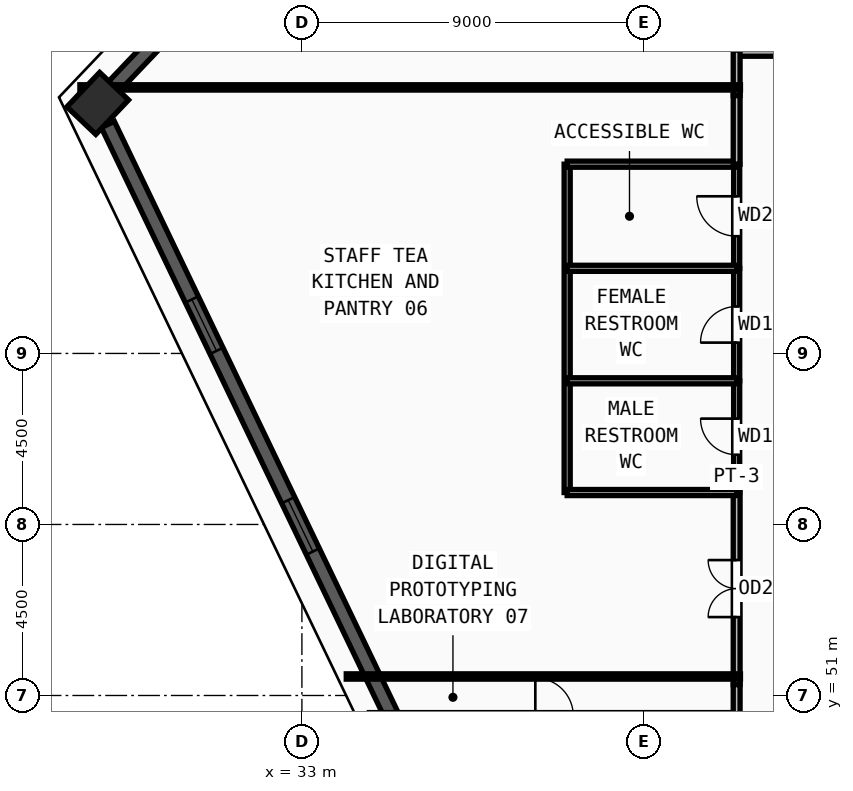
"""IFC4 building model, lengths in metres.
Left out: names, types, materials, properties, quantities, classifications, styles, units other than length and angle.
Written with IfcOpenShell. Run it as: python <this file> out.ifc"""

import sys

from ifc_helpers import new_model, si_unit, direction, frame, frame_2d, origin, origin_2d, place, context, subcontext, project, spatial, rectangle, extrude, source, transform, mapped, element, fill, save


model = new_model("IFC4")
c1 = context("Model", 3, precision=1e-05, world=origin(), true_north=direction((0.0, 1.0)))
c2 = subcontext(c1, "Body", "Model", "MODEL_VIEW")
j1 = project(units=[si_unit("LENGTHUNIT", "METRE"), si_unit("PLANEANGLEUNIT", "RADIAN")], contexts=[c1])
p1 = place(None, origin())
s1 = spatial("IfcSite", under=j1, at=p1, CompositionType="ELEMENT")
p2 = place(p1, origin())
s2 = spatial("IfcBuilding", under=s1, at=p2, CompositionType="ELEMENT")
p3 = place(p2, frame((0.0, 0.0, 236.25)))
s3 = spatial("IfcBuildingStorey", under=s2, at=p3, CompositionType="ELEMENT", Elevation=236.25)
m1 = source(origin(), c2, "Body", "SweptSolid", [
    extrude(rectangle(XDim=1.25, YDim=1.05, at=origin_2d()), origin(), (0.0, 0.0, 1.0), 3.75),
])
p4 = place(p3, frame((27.627, 66.579, 0.0), z_axis=(0.0, 0.0, 1.0), x_axis=(0.68936671806, 0.724412539946, 0.0)))
e1 = element("IfcColumn", 1, at=p4, inside=s3, PredefinedType="COLUMN", context=c2, shape_type="MappedRepresentation", body=[
    mapped(m1, transform((0.0, 0.0, 0.0), x_axis=(1.0, 0.0, 0.0), y_axis=(0.0, 1.0, 0.0), z_axis=(0.0, 0.0, 1.0), scale=1.0)),
])
p5 = place(p3, frame((30.957, 70.078, 0.0), z_axis=(0.0, 0.0, 1.0), x_axis=(-0.689456996348, -0.724326618444, 0.0)))
e2 = element("IfcWall", 2, at=p5, inside=s3, PredefinedType="SOLIDWALL", context=c2, shape_type="SweptSolid", body=[
    extrude(rectangle(XDim=4.215, YDim=0.38, at=frame_2d((2.107, 0.0))), origin(), (0.0, 0.0, 1.0), 3.57),
])
m2 = source(origin(), c2, "Body", "SweptSolid", [
    extrude(rectangle(XDim=1.2, YDim=1.9, at=frame_2d((0.6, 0.95))), frame((0.0, 0.2, 0.0), z_axis=(0.0, -1.0, 0.0), x_axis=(1.0, 0.0, 0.0)), (0.0, 0.0, 1.0), 0.4),
])
p6 = place(p5, frame((1.507, 0.0, 0.55)))
e3 = element("IfcOpeningElement", 3, at=p6, cuts=e2, PredefinedType="OPENING", context=c2, shape_type="MappedRepresentation", body=[
    mapped(m2, transform((0.0, 0.0, 0.0), x_axis=(1.0, 0.0, 0.0), y_axis=(0.0, 1.0, 0.0), z_axis=(0.0, 0.0, 1.0), scale=1.0)),
])
p7 = place(p3, frame((27.893, 66.025, 0.0), z_axis=(0.0, 0.0, 1.0), x_axis=(0.432777471902, -0.901500781926, 0.0)))
e4 = element("IfcWall", 4, at=p7, inside=s3, PredefinedType="SOLIDWALL", context=c2, shape_type="SweptSolid", body=[
    extrude(rectangle(XDim=23.432, YDim=0.38, at=frame_2d((11.716, 0.0))), origin(), (0.0, 0.0, 1.0), 3.57),
])
m3 = source(origin(), c2, "Body", "SweptSolid", [
    extrude(rectangle(XDim=1.5, YDim=1.9, at=frame_2d((0.75, 0.95))), frame((0.0, 0.2, 0.0), z_axis=(0.0, -1.0, 0.0), x_axis=(1.0, 0.0, 0.0)), (0.0, 0.0, 1.0), 0.4),
])
p8 = place(p7, frame((5.108, 0.0, 0.55)))
e5 = element("IfcOpeningElement", 5, at=p8, cuts=e4, PredefinedType="OPENING", context=c2, shape_type="MappedRepresentation", body=[
    mapped(m3, transform((0.0, 0.0, 0.0), x_axis=(1.0, 0.0, 0.0), y_axis=(0.0, 1.0, 0.0), z_axis=(0.0, 0.0, 1.0), scale=1.0)),
])
p9 = place(p7, frame((10.966, 0.0, 0.55)))
e6 = element("IfcOpeningElement", 6, at=p9, cuts=e4, PredefinedType="OPENING", context=c2, shape_type="MappedRepresentation", body=[
    mapped(m3, transform((0.0, 0.0, 0.0), x_axis=(1.0, 0.0, 0.0), y_axis=(0.0, 1.0, 0.0), z_axis=(0.0, 0.0, 1.0), scale=1.0)),
])
p10 = place(p3, frame((44.44, 56.34, 0.0), z_axis=(0.0, 0.0, 1.0), x_axis=(0.0, 1.0, 0.0)))
e7 = element("IfcWall", 7, at=p10, inside=s3, PredefinedType="PARTITIONING", context=c2, shape_type="SweptSolid", body=[
    extrude(rectangle(XDim=2.94, YDim=0.16, at=frame_2d((1.47, 0.0))), origin(), (0.0, 0.0, 1.0), 3.57),
])
m4 = source(origin(), c2, "Body", "SweptSolid", [
    extrude(rectangle(XDim=0.95, YDim=2.15, at=frame_2d((0.475, 1.075))), frame((0.0, 0.09, 0.0), z_axis=(0.0, -1.0, 0.0), x_axis=(1.0, 0.0, 0.0)), (0.0, 0.0, 1.0), 0.18),
])
p11 = place(p10, frame((0.995, 0.0, 0.0)))
e8 = element("IfcOpeningElement", 8, at=p11, cuts=e7, PredefinedType="OPENING", context=c2, shape_type="MappedRepresentation", body=[
    mapped(m4, transform((0.0, 0.0, 0.0), x_axis=(1.0, 0.0, 0.0), y_axis=(0.0, 1.0, 0.0), z_axis=(0.0, 0.0, 1.0), scale=1.0)),
])
p12 = place(p3, frame((44.44, 59.28, 0.0), z_axis=(0.0, 0.0, 1.0), x_axis=(0.0, 1.0, 0.0)))
e9 = element("IfcWall", 9, at=p12, inside=s3, PredefinedType="PARTITIONING", context=c2, shape_type="SweptSolid", body=[
    extrude(rectangle(XDim=2.96, YDim=0.16, at=frame_2d((1.48, 0.0))), origin(), (0.0, 0.0, 1.0), 3.57),
])
p13 = place(p12, frame((1.005, 0.0, 0.0)))
e10 = element("IfcOpeningElement", 10, at=p13, cuts=e9, PredefinedType="OPENING", context=c2, shape_type="MappedRepresentation", body=[
    mapped(m4, transform((0.0, 0.0, 0.0), x_axis=(1.0, 0.0, 0.0), y_axis=(0.0, 1.0, 0.0), z_axis=(0.0, 0.0, 1.0), scale=1.0)),
])
p14 = place(p3, frame((44.44, 62.24, 0.0), z_axis=(0.0, 0.0, 1.0), x_axis=(0.0, 1.0, 0.0)))
e11 = element("IfcWall", 11, at=p14, inside=s3, PredefinedType="PARTITIONING", context=c2, shape_type="SweptSolid", body=[
    extrude(rectangle(XDim=2.74, YDim=0.16, at=frame_2d((1.37, 0.0))), origin(), (0.0, 0.0, 1.0), 3.57),
])
m5 = source(origin(), c2, "Body", "SweptSolid", [
    extrude(rectangle(XDim=1.05, YDim=2.15, at=frame_2d((0.525, 1.075))), frame((0.0, 0.09, 0.0), z_axis=(0.0, -1.0, 0.0), x_axis=(1.0, 0.0, 0.0)), (0.0, 0.0, 1.0), 0.18),
])
p15 = place(p14, frame((0.845, 0.0, 0.0)))
e12 = element("IfcOpeningElement", 12, at=p15, cuts=e11, PredefinedType="OPENING", context=c2, shape_type="MappedRepresentation", body=[
    mapped(m5, transform((0.0, 0.0, 0.0), x_axis=(1.0, 0.0, 0.0), y_axis=(0.0, 1.0, 0.0), z_axis=(0.0, 0.0, 1.0), scale=1.0)),
])
p16 = place(p3, frame((44.37, 67.91, 0.0), z_axis=(0.0, 0.0, 1.0), x_axis=(1.0, 0.0, 0.0)))
e13 = element("IfcWall", 13, at=p16, inside=s3, PredefinedType="PARTITIONING", context=c2, shape_type="SweptSolid", body=[
    extrude(rectangle(XDim=11.345, YDim=0.18, at=frame_2d((5.672, 0.0))), origin(), (0.0, 0.0, 1.0), 3.205),
])
m6 = source(origin(), c2, "Body", "SweptSolid", [
    extrude(rectangle(XDim=1.5, YDim=2.2, at=frame_2d((0.75, 1.1))), frame((0.0, 0.1, 0.0), z_axis=(0.0, -1.0, 0.0), x_axis=(1.0, 0.0, 0.0)), (0.0, 0.0, 1.0), 0.2),
])
p17 = place(p16, frame((4.923, 0.0, 0.0)))
e14 = element("IfcOpeningElement", 14, at=p17, cuts=e13, PredefinedType="OPENING", context=c2, shape_type="MappedRepresentation", body=[
    mapped(m6, transform((0.0, 0.0, 0.0), x_axis=(1.0, 0.0, 0.0), y_axis=(0.0, 1.0, 0.0), z_axis=(0.0, 0.0, 1.0), scale=1.0)),
])
p18 = place(p3, frame((44.44, 51.285, 0.0), z_axis=(0.0, 0.0, 1.0), x_axis=(0.0, 1.0, 0.0)))
e15 = element("IfcWall", 15, at=p18, inside=s3, PredefinedType="PARTITIONING", context=c2, shape_type="SweptSolid", body=[
    extrude(rectangle(XDim=5.055, YDim=0.18, at=frame_2d((2.528, 0.0))), origin(), (0.0, 0.0, 1.0), 3.57),
])
p19 = place(p18, frame((1.778, 0.0, 0.0)))
e16 = element("IfcOpeningElement", 16, at=p19, cuts=e15, PredefinedType="OPENING", context=c2, shape_type="MappedRepresentation", body=[
    mapped(m6, transform((0.0, 0.0, 0.0), x_axis=(1.0, 0.0, 0.0), y_axis=(0.0, 1.0, 0.0), z_axis=(0.0, 0.0, 1.0), scale=1.0)),
])
p20 = place(p3, frame((39.98, 56.34, 0.0), z_axis=(0.0, 0.0, 1.0), x_axis=(0.0, 1.0, 0.0)))
e17 = element("IfcWall", 17, at=p20, inside=s3, PredefinedType="PARTITIONING", context=c2, shape_type="SweptSolid", body=[
    extrude(rectangle(XDim=8.64, YDim=0.16, at=frame_2d((4.32, 0.0))), origin(), (0.0, 0.0, 1.0), 3.57),
])
for number, where, z_axis, x_axis in (
    (18, (39.98, 56.34, 0.0), (0.0, 0.0, 1.0), (1.0, 0.0, 0.0)),
    (19, (39.98, 59.28, 0.0), (0.0, 0.0, 1.0), (1.0, 0.0, 0.0)),
    (20, (39.98, 62.24, 0.0), (0.0, 0.0, 1.0), (1.0, 0.0, 0.0)),
    (21, (39.98, 64.98, 0.0), (0.0, 0.0, 1.0), (1.0, 0.0, 0.0)),
):
    element("IfcWall", number, at=place(p3, frame(where, z_axis=z_axis, x_axis=x_axis)), inside=s3, PredefinedType="PARTITIONING", context=c2, shape_type="SweptSolid", body=[
        extrude(rectangle(XDim=4.46, YDim=0.16, at=frame_2d((2.23, 0.0))), origin(), (0.0, 0.0, 1.0), 3.57),
    ])
p21 = place(p3, frame((44.44, 66.785, 0.0), z_axis=(0.0, 0.0, 1.0), x_axis=(0.0, 1.0, 0.0)))
e22 = element("IfcWall", 22, at=p21, inside=s3, PredefinedType="PARTITIONING", context=c2, shape_type="SweptSolid", body=[
    extrude(rectangle(XDim=1.195, YDim=0.18, at=frame_2d((0.598, 0.0))), origin(), (0.0, 0.0, 1.0), 3.57),
])
p22 = place(p3, frame((44.44, 64.98, 0.0), z_axis=(0.0, 0.0, 1.0), x_axis=(0.0, 1.0, 0.0)))
e23 = element("IfcWall", 23, at=p22, inside=s3, PredefinedType="PARTITIONING", context=c2, shape_type="SweptSolid", body=[
    extrude(rectangle(XDim=1.805, YDim=0.18, at=frame_2d((0.902, 0.0))), origin(), (0.0, 0.0, 1.0), 3.57),
])
p23 = place(p3, frame((44.44, 50.39, 0.0), z_axis=(0.0, 0.0, 1.0), x_axis=(0.0, 1.0, 0.0)))
e24 = element("IfcWall", 24, at=p23, inside=s3, PredefinedType="PARTITIONING", context=c2, shape_type="SweptSolid", body=[
    extrude(rectangle(XDim=0.895, YDim=0.18, at=frame_2d((0.448, 0.0))), origin(), (0.0, 0.0, 1.0), 3.205),
])
p24 = place(p3, frame((44.54, 51.5, 0.0), z_axis=(0.0, 0.0, 1.0), x_axis=(-1.0, 0.0, 0.0)))
e25 = element("IfcWall", 25, at=p24, inside=s3, PredefinedType="PARTITIONING", context=c2, shape_type="SweptSolid", body=[
    extrude(rectangle(XDim=10.373, YDim=0.14, at=frame_2d((5.187, 0.0))), origin(), (0.0, 0.0, 1.0), 3.57),
])
p25 = place(p3, frame((44.54, 67.0, 0.0), z_axis=(0.0, 0.0, 1.0), x_axis=(-1.0, 0.0, 0.0)))
e26 = element("IfcWall", 26, at=p25, inside=s3, PredefinedType="PARTITIONING", context=c2, shape_type="SweptSolid", body=[
    extrude(rectangle(XDim=17.382, YDim=0.14, at=frame_2d((8.691, 0.0))), origin(), (0.0, 0.0, 1.0), 3.57),
])
m7 = source(origin(), c2, "Body", "SweptSolid", [
    extrude(rectangle(XDim=1.5, YDim=1.9, at=frame_2d((0.75, 0.95))), frame((0.0, 0.03, 0.0), z_axis=(0.0, -1.0, 0.0), x_axis=(1.0, 0.0, 0.0)), (0.0, 0.0, 1.0), 0.06),
])
p26 = place(p8, origin())
e27 = element("IfcWindow", 27, at=p26, inside=s3, PartitioningType="DOUBLE_PANEL_VERTICAL", PredefinedType="WINDOW", context=c2, shape_type="MappedRepresentation", body=[
    mapped(m7, transform((0.0, 0.0, 0.0), x_axis=(1.0, 0.0, 0.0), y_axis=(0.0, 1.0, 0.0), z_axis=(0.0, 0.0, 1.0), scale=1.0)),
])
fill(e5, e27)
p27 = place(p9, origin())
e28 = element("IfcWindow", 28, at=p27, inside=s3, PartitioningType="DOUBLE_PANEL_VERTICAL", PredefinedType="WINDOW", context=c2, shape_type="MappedRepresentation", body=[
    mapped(m7, transform((0.0, 0.0, 0.0), x_axis=(1.0, 0.0, 0.0), y_axis=(0.0, 1.0, 0.0), z_axis=(0.0, 0.0, 1.0), scale=1.0)),
])
fill(e6, e28)
m8 = source(origin(), c2, "Body", "SweptSolid", [
    extrude(rectangle(XDim=0.95, YDim=2.15, at=frame_2d((0.475, 1.075))), frame((0.0, 0.025, 0.0), z_axis=(0.0, -1.0, 0.0), x_axis=(1.0, 0.0, 0.0)), (0.0, 0.0, 1.0), 0.05),
])
p28 = place(p11, origin())
e29 = element("IfcDoor", 29, at=p28, inside=s3, OperationType="SINGLE_SWING_RIGHT", PredefinedType="DOOR", context=c2, shape_type="MappedRepresentation", body=[
    mapped(m8, transform((0.0, 0.0, 0.0), x_axis=(1.0, 0.0, 0.0), y_axis=(0.0, 1.0, 0.0), z_axis=(0.0, 0.0, 1.0), scale=1.0)),
])
fill(e8, e29)
p29 = place(p13, origin())
e30 = element("IfcDoor", 30, at=p29, inside=s3, OperationType="SINGLE_SWING_LEFT", PredefinedType="DOOR", context=c2, shape_type="MappedRepresentation", body=[
    mapped(m8, transform((0.0, 0.0, 0.0), x_axis=(1.0, 0.0, 0.0), y_axis=(0.0, 1.0, 0.0), z_axis=(0.0, 0.0, 1.0), scale=1.0)),
])
fill(e10, e30)
m9 = source(origin(), c2, "Body", "SweptSolid", [
    extrude(rectangle(XDim=1.05, YDim=2.15, at=frame_2d((0.525, 1.075))), frame((0.0, 0.025, 0.0), z_axis=(0.0, -1.0, 0.0), x_axis=(1.0, 0.0, 0.0)), (0.0, 0.0, 1.0), 0.05),
])
p30 = place(p15, origin())
e31 = element("IfcDoor", 31, at=p30, inside=s3, OperationType="SINGLE_SWING_RIGHT", PredefinedType="DOOR", context=c2, shape_type="MappedRepresentation", body=[
    mapped(m9, transform((0.0, 0.0, 0.0), x_axis=(1.0, 0.0, 0.0), y_axis=(0.0, 1.0, 0.0), z_axis=(0.0, 0.0, 1.0), scale=1.0)),
])
fill(e12, e31)
m10 = source(origin(), c2, "Body", "SweptSolid", [
    extrude(rectangle(XDim=1.5, YDim=2.2, at=frame_2d((0.75, 1.1))), frame((0.0, 0.025, 0.0), z_axis=(0.0, -1.0, 0.0), x_axis=(1.0, 0.0, 0.0)), (0.0, 0.0, 1.0), 0.05),
])
p31 = place(p19, origin())
e32 = element("IfcDoor", 32, at=p31, inside=s3, OperationType="DOUBLE_DOOR_SINGLE_SWING", PredefinedType="DOOR", context=c2, shape_type="MappedRepresentation", body=[
    mapped(m10, transform((0.0, 0.0, 0.0), x_axis=(1.0, 0.0, 0.0), y_axis=(0.0, 1.0, 0.0), z_axis=(0.0, 0.0, 1.0), scale=1.0)),
])
fill(e16, e32)
save(model, sys.argv[1])
